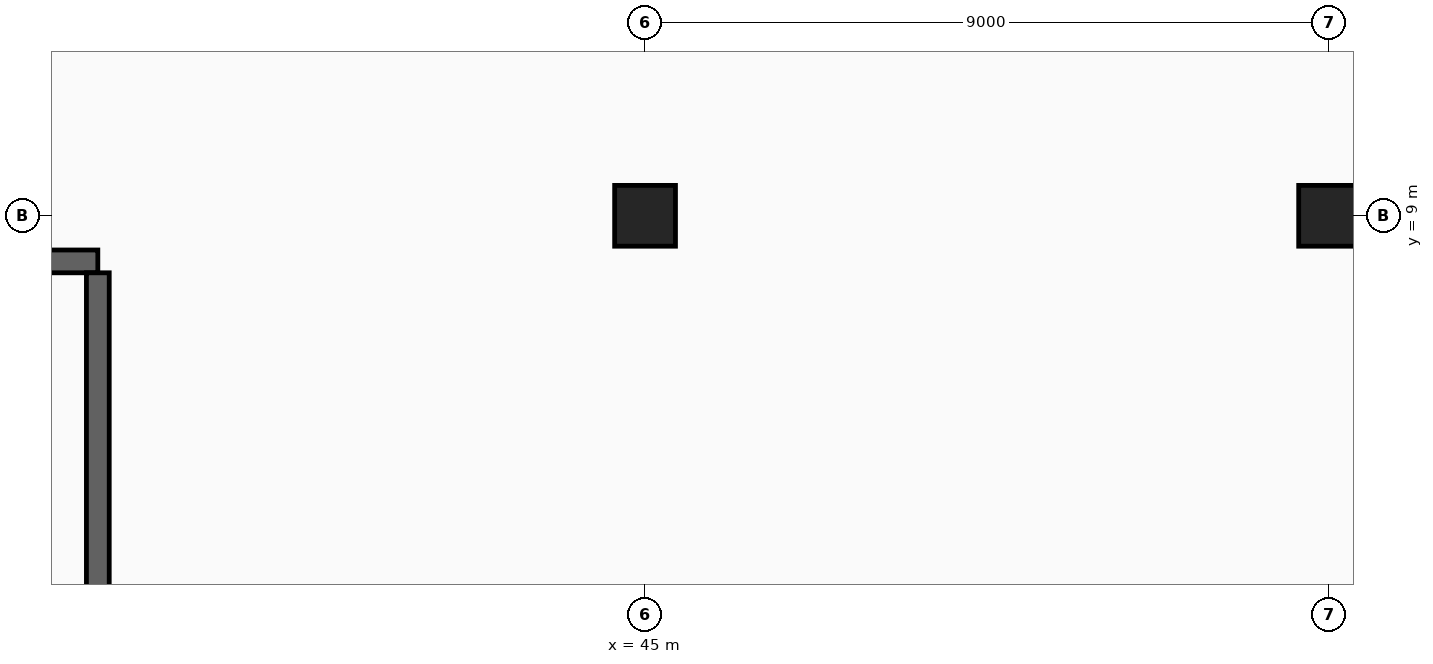
"""IFC4 building model, lengths in metres.
Left out: names, types, materials, properties, quantities, classifications, styles, units other than length and angle.
Written with IfcOpenShell. Run it as: python <this file> out.ifc"""

import sys

from ifc_helpers import new_model, si_unit, direction, frame, frame_2d, origin, origin_2d, place, context, subcontext, project, spatial, rectangle, extrude, element, save


model = new_model("IFC4")
c1 = context("Model", 3, precision=1e-05, world=origin(), true_north=direction((0.0, 1.0)))
c2 = subcontext(c1, "Body", "Model", "MODEL_VIEW")
j1 = project(units=[si_unit("LENGTHUNIT", "METRE"), si_unit("PLANEANGLEUNIT", "RADIAN")], contexts=[c1])
p1 = place(None, origin())
s1 = spatial("IfcSite", under=j1, at=p1, CompositionType="ELEMENT")
p2 = place(p1, origin())
s2 = spatial("IfcBuilding", under=s1, at=p2, CompositionType="ELEMENT")
p3 = place(p2, frame((0.0, 0.0, -5.1)))
s3 = spatial("IfcBuildingStorey", under=s2, at=p3, CompositionType="ELEMENT", Elevation=-5.1)
for number, where, z_axis, x_axis in (
    (1, (45.0, 9.0, 0.0), (0.0, 0.0, 1.0), (1.0, 0.0, 0.0)),
    (2, (54.0, 9.0, 0.0), (0.0, 0.0, 1.0), (1.0, 0.0, 0.0)),
):
    element("IfcColumn", number, at=place(p3, frame(where, z_axis=z_axis, x_axis=x_axis)), inside=s3, PredefinedType="COLUMN", context=c2, shape_type="SweptSolid", body=[
        extrude(rectangle(XDim=0.8, YDim=0.8, at=origin_2d()), origin(), (0.0, 0.0, 1.0), 5.1),
    ])
p4 = place(p3, frame((27.5, 8.4, 0.0), z_axis=(0.0, 0.0, 1.0), x_axis=(1.0, 0.0, 0.0)))
e3 = element("IfcWall", 3, at=p4, inside=s3, PredefinedType="SHEAR", context=c2, shape_type="SweptSolid", body=[
    extrude(rectangle(XDim=10.3, YDim=0.3, at=frame_2d((5.15, 0.0))), origin(), (0.0, 0.0, 1.0), 5.1),
])
p5 = place(p3, frame((37.8, 3.15, 0.0), z_axis=(0.0, 0.0, 1.0), x_axis=(0.0, 1.0, 0.0)))
e4 = element("IfcWall", 4, at=p5, inside=s3, PredefinedType="SHEAR", context=c2, shape_type="SweptSolid", body=[
    extrude(rectangle(XDim=5.1, YDim=0.3, at=frame_2d((2.55, 0.0))), origin(), (0.0, 0.0, 1.0), 5.1),
])
save(model, sys.argv[1])
